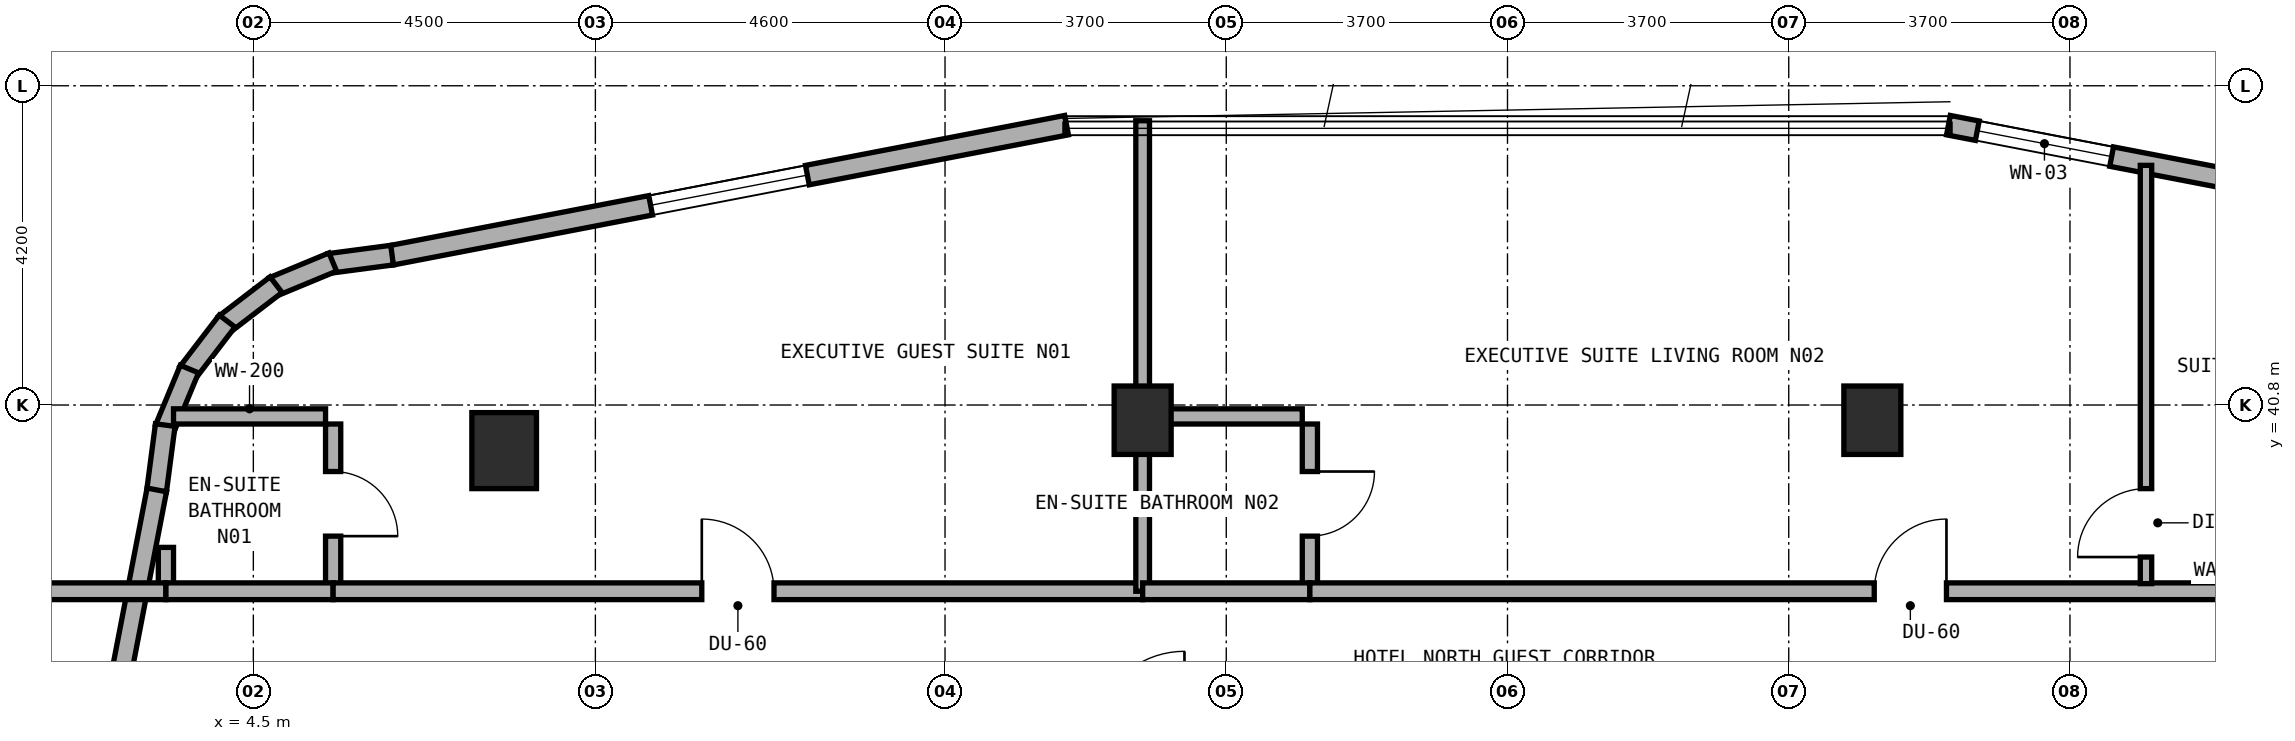
"""IFC4 building model, lengths in metres.
Left out: names, types, materials, properties, quantities, classifications, styles, units other than length and angle.
Written with IfcOpenShell. Run it as: python <this file> out.ifc"""

import sys

from ifc_helpers import new_model, si_unit, direction, frame, frame_2d, origin, origin_2d, place, context, subcontext, project, spatial, rectangle, extrude, element, fill, save


model = new_model("IFC4")
c1 = context("Model", 3, precision=1e-05, world=origin(), true_north=direction((0.0, 1.0)))
c2 = subcontext(c1, "Body", "Model", "MODEL_VIEW")
j1 = project(units=[si_unit("LENGTHUNIT", "METRE"), si_unit("PLANEANGLEUNIT", "RADIAN")], contexts=[c1])
p1 = place(None, origin())
s1 = spatial("IfcSite", under=j1, at=p1, CompositionType="ELEMENT")
p2 = place(p1, origin())
s2 = spatial("IfcBuilding", under=s1, at=p2, CompositionType="ELEMENT")
p3 = place(p2, frame((0.0, 0.0, 181.1)))
s3 = spatial("IfcBuildingStorey", under=s2, at=p3, CompositionType="ELEMENT", Elevation=181.1)
for number, where, z_axis, x_axis in (
    (1, (16.2, 40.6, 0.0), (0.0, 0.0, 1.0), (1.0, 0.0, 0.0)),
    (2, (25.8, 40.6, 0.0), (0.0, 0.0, 1.0), (1.0, 0.0, 0.0)),
):
    element("IfcColumn", number, at=place(p3, frame(where, z_axis=z_axis, x_axis=x_axis)), inside=s3, PredefinedType="COLUMN", context=c2, shape_type="SweptSolid", body=[
        extrude(rectangle(XDim=0.75, YDim=0.9, at=origin_2d()), origin(), (0.0, 0.0, 1.0), 3.6),
    ])
p4 = place(p3, frame((7.8, 40.2, 0.0), z_axis=(0.0, 0.0, 1.0), x_axis=(1.0, 0.0, 0.0)))
e3 = element("IfcColumn", 3, at=p4, inside=s3, PredefinedType="COLUMN", context=c2, shape_type="SweptSolid", body=[
    extrude(rectangle(XDim=0.85, YDim=1.0, at=origin_2d()), origin(), (0.0, 0.0, 1.0), 3.6),
])
p5 = place(p3, frame((35.683, 42.77, 0.0), z_axis=(0.0, 0.0, 1.0), x_axis=(-0.98192801022, 0.189254809039, 0.0)))
e4 = element("IfcWall", 4, at=p5, inside=s3, PredefinedType="STANDARD", context=c2, shape_type="SweptSolid", body=[
    extrude(rectangle(XDim=9.046, YDim=0.26, at=frame_2d((4.523, 0.0))), origin(), (0.0, 0.0, 1.0), 3.32),
])
p6 = place(p5, frame((2.88, 0.0, 0.85)))
e5 = element("IfcOpeningElement", 5, at=p6, cuts=e4, PredefinedType="OPENING", context=c2, shape_type="SweptSolid", body=[
    extrude(rectangle(XDim=2.1, YDim=1.5, at=frame_2d((1.05, 0.75))), frame((0.0, 0.14, 0.0), z_axis=(0.0, -1.0, 0.0), x_axis=(1.0, 0.0, 0.0)), (0.0, 0.0, 1.0), 0.28),
])
p7 = place(p5, frame((6.859, 0.0, 0.85)))
e6 = element("IfcOpeningElement", 6, at=p7, cuts=e4, PredefinedType="OPENING", context=c2, shape_type="SweptSolid", body=[
    extrude(rectangle(XDim=1.8, YDim=1.5, at=frame_2d((0.9, 0.75))), frame((0.0, 0.14, 0.0), z_axis=(0.0, -1.0, 0.0), x_axis=(1.0, 0.0, 0.0)), (0.0, 0.0, 1.0), 0.28),
])
p8 = place(p3, frame((15.199, 44.482, 0.0), z_axis=(0.0, 0.0, 1.0), x_axis=(-0.98192801022, -0.189254809039, 0.0)))
e7 = element("IfcWall", 7, at=p8, inside=s3, PredefinedType="STANDARD", context=c2, shape_type="SweptSolid", body=[
    extrude(rectangle(XDim=9.046, YDim=0.26, at=frame_2d((4.523, 0.0))), origin(), (0.0, 0.0, 1.0), 3.32),
])
p9 = place(p8, frame((3.473, 0.0, 0.85)))
e8 = element("IfcOpeningElement", 8, at=p9, cuts=e7, PredefinedType="OPENING", context=c2, shape_type="SweptSolid", body=[
    extrude(rectangle(XDim=2.1, YDim=1.5, at=frame_2d((1.05, 0.75))), frame((0.0, 0.14, 0.0), z_axis=(0.0, -1.0, 0.0), x_axis=(1.0, 0.0, 0.0)), (0.0, 0.0, 1.0), 0.28),
])
p10 = place(p3, frame((6.325, 42.772, 0.0), z_axis=(0.0, 0.0, 1.0), x_axis=(-0.99142134712, -0.130704676564, 0.0)))
e9 = element("IfcWall", 9, at=p10, inside=s3, PredefinedType="STANDARD", context=c2, shape_type="SweptSolid", body=[
    extrude(rectangle(XDim=0.833, YDim=0.26, at=frame_2d((0.417, 0.0))), origin(), (0.0, 0.0, 1.0), 3.32),
])
p11 = place(p3, frame((5.545, 42.681, 0.0), z_axis=(0.0, 0.0, 1.0), x_axis=(-0.923712395518, -0.383086687796, 0.0)))
e10 = element("IfcWall", 10, at=p11, inside=s3, PredefinedType="STANDARD", context=c2, shape_type="SweptSolid", body=[
    extrude(rectangle(XDim=0.851, YDim=0.26, at=frame_2d((0.425, 0.0))), origin(), (0.0, 0.0, 1.0), 3.32),
])
for number, where, z_axis, x_axis in (
    (11, (4.799, 42.383, 0.0), (0.0, 0.0, 1.0), (-0.794, -0.608, 0.0)),
    (12, (4.155, 41.904, 0.0), (0.0, 0.0, 1.0), (-0.608, -0.794, 0.0)),
):
    element("IfcWall", number, at=place(p3, frame(where, z_axis=z_axis, x_axis=x_axis)), inside=s3, PredefinedType="STANDARD", context=c2, shape_type="SweptSolid", body=[
        extrude(rectangle(XDim=0.85, YDim=0.26, at=frame_2d((0.425, 0.0))), origin(), (0.0, 0.0, 1.0), 3.32),
    ])
p12 = place(p3, frame((3.659, 41.273, 0.0), z_axis=(0.0, 0.0, 1.0), x_axis=(-0.383086687796, -0.923712395518, 0.0)))
e13 = element("IfcWall", 13, at=p12, inside=s3, PredefinedType="STANDARD", context=c2, shape_type="SweptSolid", body=[
    extrude(rectangle(XDim=0.851, YDim=0.26, at=frame_2d((0.425, 0.0))), origin(), (0.0, 0.0, 1.0), 3.32),
])
p13 = place(p3, frame((3.341, 40.536, 0.0), z_axis=(0.0, 0.0, 1.0), x_axis=(-0.130192647656, -0.991488716273, 0.0)))
e14 = element("IfcWall", 14, at=p13, inside=s3, PredefinedType="STANDARD", context=c2, shape_type="SweptSolid", body=[
    extrude(rectangle(XDim=0.868, YDim=0.26, at=frame_2d((0.434, 0.0))), origin(), (0.0, 0.0, 1.0), 3.32),
])
p14 = place(p3, frame((3.23, 39.683, 0.0), z_axis=(0.0, 0.0, 1.0), x_axis=(-0.189254809039, -0.98192801022, 0.0)))
e15 = element("IfcWall", 15, at=p14, inside=s3, PredefinedType="STANDARD", context=c2, shape_type="SweptSolid", body=[
    extrude(rectangle(XDim=9.046, YDim=0.26, at=frame_2d((4.523, 0.0))), origin(), (0.0, 0.0, 1.0), 3.32),
])
p15 = place(p14, frame((4.212, 0.0, 0.85)))
e16 = element("IfcOpeningElement", 16, at=p15, cuts=e15, PredefinedType="OPENING", context=c2, shape_type="SweptSolid", body=[
    extrude(rectangle(XDim=2.1, YDim=1.5, at=frame_2d((1.05, 0.75))), frame((0.0, 0.14, 0.0), z_axis=(0.0, -1.0, 0.0), x_axis=(1.0, 0.0, 0.0)), (0.0, 0.0, 1.0), 0.28),
])
p16 = place(p3, frame((5.55, 38.45, 0.0), z_axis=(0.0, 0.0, 1.0), x_axis=(0.0, 1.0, 0.0)))
e17 = element("IfcWall", 17, at=p16, inside=s3, PredefinedType="PLUMBINGWALL", context=c2, shape_type="SweptSolid", body=[
    extrude(rectangle(XDim=2.1, YDim=0.2, at=frame_2d((1.05, 0.0))), origin(), (0.0, 0.0, 1.0), 3.32),
])
p17 = place(p16, frame((0.625, 0.0, 0.0)))
e18 = element("IfcOpeningElement", 18, at=p17, cuts=e17, PredefinedType="OPENING", context=c2, shape_type="SweptSolid", body=[
    extrude(rectangle(XDim=0.85, YDim=2.1, at=frame_2d((0.425, 1.05))), frame((0.0, 0.11, 0.0), z_axis=(0.0, -1.0, 0.0), x_axis=(1.0, 0.0, 0.0)), (0.0, 0.0, 1.0), 0.22),
])
p18 = place(p3, frame((3.45, 40.65, 0.0), z_axis=(0.0, 0.0, 1.0), x_axis=(1.0, 0.0, 0.0)))
e19 = element("IfcWall", 19, at=p18, inside=s3, PredefinedType="PLUMBINGWALL", context=c2, shape_type="SweptSolid", body=[
    extrude(rectangle(XDim=2.0, YDim=0.2, at=frame_2d((1.0, 0.0))), origin(), (0.0, 0.0, 1.0), 3.32),
])
p19 = place(p3, frame((3.35, 38.35, 0.0), z_axis=(0.0, 0.0, 1.0), x_axis=(0.0, 1.0, 0.0)))
e20 = element("IfcWall", 20, at=p19, inside=s3, PredefinedType="PLUMBINGWALL", context=c2, shape_type="SweptSolid", body=[
    extrude(rectangle(XDim=0.577, YDim=0.2, at=frame_2d((0.289, 0.0))), origin(), (0.0, 0.0, 1.0), 3.32),
])
p20 = place(p3, frame((1.56, 38.35, 0.0), z_axis=(0.0, 0.0, 1.0), x_axis=(1.0, 0.0, 0.0)))
e21 = element("IfcWall", 21, at=p20, inside=s3, PredefinedType="SOLIDWALL", context=c2, shape_type="SweptSolid", body=[
    extrude(rectangle(XDim=1.79, YDim=0.22, at=frame_2d((0.895, 0.0))), origin(), (0.0, 0.0, 1.0), 3.32),
])
p21 = place(p3, frame((3.35, 38.35, 0.0), z_axis=(0.0, 0.0, 1.0), x_axis=(1.0, 0.0, 0.0)))
e22 = element("IfcWall", 22, at=p21, inside=s3, PredefinedType="SOLIDWALL", context=c2, shape_type="SweptSolid", body=[
    extrude(rectangle(XDim=2.2, YDim=0.22, at=frame_2d((1.1, 0.0))), origin(), (0.0, 0.0, 1.0), 3.32),
])
p22 = place(p3, frame((5.55, 38.35, 0.0), z_axis=(0.0, 0.0, 1.0), x_axis=(1.0, 0.0, 0.0)))
e23 = element("IfcWall", 23, at=p22, inside=s3, PredefinedType="SOLIDWALL", context=c2, shape_type="SweptSolid", body=[
    extrude(rectangle(XDim=10.65, YDim=0.22, at=frame_2d((5.325, 0.0))), origin(), (0.0, 0.0, 1.0), 2.995),
])
p23 = place(p22, frame((4.85, 0.0, 0.0)))
e24 = element("IfcOpeningElement", 24, at=p23, cuts=e23, PredefinedType="OPENING", context=c2, shape_type="SweptSolid", body=[
    extrude(rectangle(XDim=0.95, YDim=2.1, at=frame_2d((0.475, 1.05))), frame((0.0, 0.12, 0.0), z_axis=(0.0, -1.0, 0.0), x_axis=(1.0, 0.0, 0.0)), (0.0, 0.0, 1.0), 0.24),
])
p24 = place(p3, frame((16.2, 38.35, 0.0), z_axis=(0.0, 0.0, 1.0), x_axis=(0.0, 1.0, 0.0)))
e25 = element("IfcWall", 25, at=p24, inside=s3, PredefinedType="SOLIDWALL", context=c2, shape_type="SweptSolid", body=[
    extrude(rectangle(XDim=6.19, YDim=0.18, at=frame_2d((3.095, 0.0))), origin(), (0.0, 0.0, 1.0), 2.935),
])
p25 = place(p3, frame((18.4, 38.45, 0.0), z_axis=(0.0, 0.0, 1.0), x_axis=(0.0, 1.0, 0.0)))
e26 = element("IfcWall", 26, at=p25, inside=s3, PredefinedType="PLUMBINGWALL", context=c2, shape_type="SweptSolid", body=[
    extrude(rectangle(XDim=2.1, YDim=0.2, at=frame_2d((1.05, 0.0))), origin(), (0.0, 0.0, 1.0), 2.895),
])
p26 = place(p25, frame((0.625, 0.0, 0.0)))
e27 = element("IfcOpeningElement", 27, at=p26, cuts=e26, PredefinedType="OPENING", context=c2, shape_type="SweptSolid", body=[
    extrude(rectangle(XDim=0.85, YDim=2.1, at=frame_2d((0.425, 1.05))), frame((0.0, 0.11, 0.0), z_axis=(0.0, -1.0, 0.0), x_axis=(1.0, 0.0, 0.0)), (0.0, 0.0, 1.0), 0.22),
])
p27 = place(p3, frame((16.3, 40.65, 0.0), z_axis=(0.0, 0.0, 1.0), x_axis=(1.0, 0.0, 0.0)))
e28 = element("IfcWall", 28, at=p27, inside=s3, PredefinedType="PLUMBINGWALL", context=c2, shape_type="SweptSolid", body=[
    extrude(rectangle(XDim=2.0, YDim=0.2, at=frame_2d((1.0, 0.0))), origin(), (0.0, 0.0, 1.0), 2.935),
])
p28 = place(p3, frame((16.2, 38.35, 0.0), z_axis=(0.0, 0.0, 1.0), x_axis=(1.0, 0.0, 0.0)))
e29 = element("IfcWall", 29, at=p28, inside=s3, PredefinedType="SOLIDWALL", context=c2, shape_type="SweptSolid", body=[
    extrude(rectangle(XDim=2.2, YDim=0.22, at=frame_2d((1.1, 0.0))), origin(), (0.0, 0.0, 1.0), 2.995),
])
p29 = place(p3, frame((18.4, 38.35, 0.0), z_axis=(0.0, 0.0, 1.0), x_axis=(1.0, 0.0, 0.0)))
e30 = element("IfcWall", 30, at=p29, inside=s3, PredefinedType="SOLIDWALL", context=c2, shape_type="SweptSolid", body=[
    extrude(rectangle(XDim=15.8, YDim=0.22, at=frame_2d((7.9, 0.0))), origin(), (0.0, 0.0, 1.0), 2.995),
])
p30 = place(p29, frame((7.425, 0.0, 0.0)))
e31 = element("IfcOpeningElement", 31, at=p30, cuts=e30, PredefinedType="OPENING", context=c2, shape_type="SweptSolid", body=[
    extrude(rectangle(XDim=0.95, YDim=2.1, at=frame_2d((0.475, 1.05))), frame((0.0, 0.12, 0.0), z_axis=(0.0, -1.0, 0.0), x_axis=(1.0, 0.0, 0.0)), (0.0, 0.0, 1.0), 0.24),
])
p31 = place(p3, frame((29.4, 38.45, 0.0), z_axis=(0.0, 0.0, 1.0), x_axis=(0.0, 1.0, 0.0)))
e32 = element("IfcWall", 32, at=p31, inside=s3, PredefinedType="PARTITIONING", context=c2, shape_type="SweptSolid", body=[
    extrude(rectangle(XDim=5.503, YDim=0.15, at=frame_2d((2.751, 0.0))), origin(), (0.0, 0.0, 1.0), 2.895),
])
p32 = place(p31, frame((0.35, 0.0, 0.0)))
e33 = element("IfcOpeningElement", 33, at=p32, cuts=e32, PredefinedType="OPENING", context=c2, shape_type="SweptSolid", body=[
    extrude(rectangle(XDim=0.9, YDim=2.1, at=frame_2d((0.45, 1.05))), frame((0.0, 0.085, 0.0), z_axis=(0.0, -1.0, 0.0), x_axis=(1.0, 0.0, 0.0)), (0.0, 0.0, 1.0), 0.17),
])
p33 = place(p7, origin())
e34 = element("IfcWindow", 34, at=p33, inside=s3, PartitioningType="SINGLE_PANEL", PredefinedType="WINDOW", context=c2, shape_type="SweptSolid", body=[
    extrude(rectangle(XDim=1.8, YDim=1.5, at=frame_2d((0.9, 0.75))), frame((0.0, 0.03, 0.0), z_axis=(0.0, -1.0, 0.0), x_axis=(1.0, 0.0, 0.0)), (0.0, 0.0, 1.0), 0.06),
])
fill(e6, e34)
p34 = place(p9, origin())
e35 = element("IfcWindow", 35, at=p34, inside=s3, PartitioningType="SINGLE_PANEL", PredefinedType="WINDOW", context=c2, shape_type="SweptSolid", body=[
    extrude(rectangle(XDim=2.1, YDim=1.5, at=frame_2d((1.05, 0.75))), frame((0.0, 0.03, 0.0), z_axis=(0.0, -1.0, 0.0), x_axis=(1.0, 0.0, 0.0)), (0.0, 0.0, 1.0), 0.06),
])
fill(e8, e35)
p35 = place(p17, frame((0.85, 0.0, 0.0), z_axis=(0.0, 0.0, 1.0), x_axis=(-1.0, 0.0, 0.0)))
e36 = element("IfcDoor", 36, at=p35, inside=s3, OperationType="SINGLE_SWING_RIGHT", PredefinedType="DOOR", context=c2, shape_type="SweptSolid", body=[
    extrude(rectangle(XDim=0.85, YDim=2.1, at=frame_2d((0.425, 1.05))), frame((0.0, 0.025, 0.0), z_axis=(0.0, -1.0, 0.0), x_axis=(1.0, 0.0, 0.0)), (0.0, 0.0, 1.0), 0.05),
])
fill(e18, e36)
p36 = place(p23, origin())
e37 = element("IfcDoor", 37, at=p36, inside=s3, OperationType="SINGLE_SWING_LEFT", PredefinedType="DOOR", context=c2, shape_type="SweptSolid", body=[
    extrude(rectangle(XDim=0.95, YDim=2.1, at=frame_2d((0.475, 1.05))), frame((0.0, 0.025, 0.0), z_axis=(0.0, -1.0, 0.0), x_axis=(1.0, 0.0, 0.0)), (0.0, 0.0, 1.0), 0.05),
])
fill(e24, e37)
p37 = place(p26, frame((0.85, 0.0, 0.0), z_axis=(0.0, 0.0, 1.0), x_axis=(-1.0, 0.0, 0.0)))
e38 = element("IfcDoor", 38, at=p37, inside=s3, OperationType="SINGLE_SWING_LEFT", PredefinedType="DOOR", context=c2, shape_type="SweptSolid", body=[
    extrude(rectangle(XDim=0.85, YDim=2.1, at=frame_2d((0.425, 1.05))), frame((0.0, 0.025, 0.0), z_axis=(0.0, -1.0, 0.0), x_axis=(1.0, 0.0, 0.0)), (0.0, 0.0, 1.0), 0.05),
])
fill(e27, e38)
p38 = place(p30, origin())
e39 = element("IfcDoor", 39, at=p38, inside=s3, OperationType="SINGLE_SWING_RIGHT", PredefinedType="DOOR", context=c2, shape_type="SweptSolid", body=[
    extrude(rectangle(XDim=0.95, YDim=2.1, at=frame_2d((0.475, 1.05))), frame((0.0, 0.025, 0.0), z_axis=(0.0, -1.0, 0.0), x_axis=(1.0, 0.0, 0.0)), (0.0, 0.0, 1.0), 0.05),
])
fill(e31, e39)
p39 = place(p32, origin())
e40 = element("IfcDoor", 40, at=p39, inside=s3, OperationType="SINGLE_SWING_LEFT", PredefinedType="DOOR", context=c2, shape_type="SweptSolid", body=[
    extrude(rectangle(XDim=0.9, YDim=2.1, at=frame_2d((0.45, 1.05))), frame((0.0, 0.025, 0.0), z_axis=(0.0, -1.0, 0.0), x_axis=(1.0, 0.0, 0.0)), (0.0, 0.0, 1.0), 0.05),
])
fill(e33, e40)
save(model, sys.argv[1])
